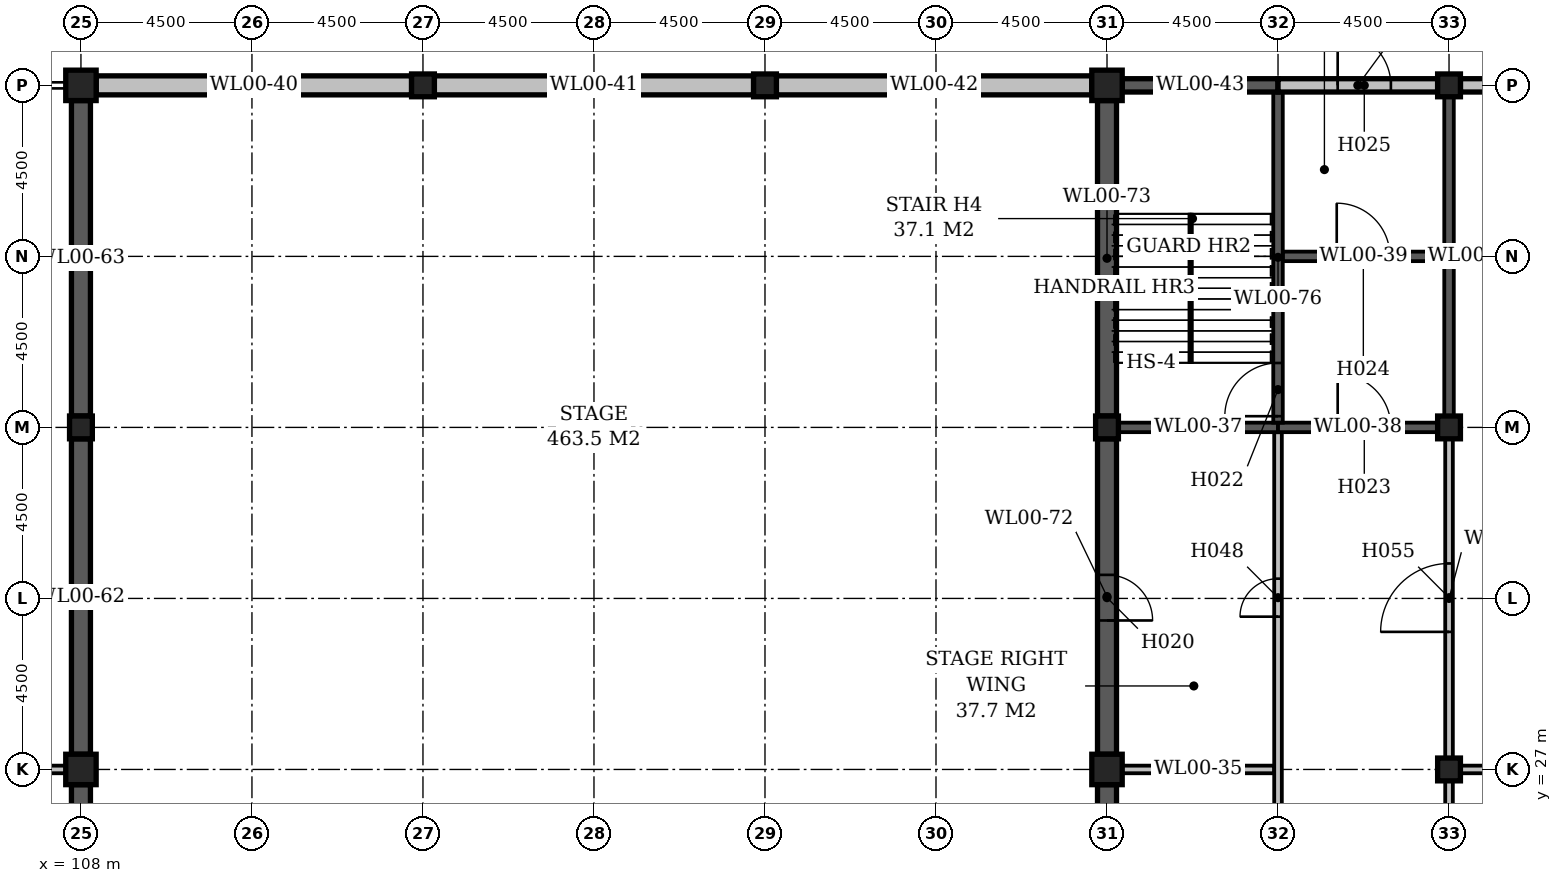
"""IFC4 building model, lengths in metres.
Left out: names, types, materials, properties, quantities, classifications, styles, units other than length and angle.
Written with IfcOpenShell. Run it as: python <this file> out.ifc"""

import sys

from ifc_helpers import new_model, si_unit, direction, frame, frame_2d, origin, origin_2d, place, context, subcontext, project, spatial, rectangle, extrude, element, fill, save


model = new_model("IFC4")
c1 = context("Model", 3, precision=1e-05, world=origin(), true_north=direction((0.0, 1.0)))
c2 = subcontext(c1, "Body", "Model", "MODEL_VIEW")
j1 = project(units=[si_unit("LENGTHUNIT", "METRE"), si_unit("PLANEANGLEUNIT", "RADIAN")], contexts=[c1])
p1 = place(None, origin())
s1 = spatial("IfcSite", under=j1, at=p1, CompositionType="ELEMENT")
p2 = place(p1, origin())
s2 = spatial("IfcBuilding", under=s1, at=p2, CompositionType="ELEMENT")
p3 = place(p2, origin())
s3 = spatial("IfcBuildingStorey", under=s2, at=p3, CompositionType="ELEMENT", Elevation=0.0)
p4 = place(p3, frame((108.0, 27.0, -0.3), z_axis=(0.0, 0.0, 1.0), x_axis=(1.0, 0.0, 0.0)))
e1 = element("IfcColumn", 1, at=p4, inside=s3, PredefinedType="COLUMN", context=c2, shape_type="SweptSolid", body=[
    extrude(rectangle(XDim=0.8, YDim=0.8, at=origin_2d()), origin(), (0.0, 0.0, 1.0), 9.0),
])
p5 = place(p3, frame((108.0, 36.0, -0.3), z_axis=(0.0, 0.0, 1.0), x_axis=(1.0, 0.0, 0.0)))
e2 = element("IfcColumn", 2, at=p5, inside=s3, PredefinedType="COLUMN", context=c2, shape_type="SweptSolid", body=[
    extrude(rectangle(XDim=0.6, YDim=0.6, at=origin_2d()), origin(), (0.0, 0.0, 1.0), 9.0),
])
p6 = place(p3, frame((108.0, 45.0, -0.3), z_axis=(0.0, 0.0, 1.0), x_axis=(1.0, 0.0, 0.0)))
e3 = element("IfcColumn", 3, at=p6, inside=s3, PredefinedType="COLUMN", context=c2, shape_type="SweptSolid", body=[
    extrude(rectangle(XDim=0.8, YDim=0.8, at=origin_2d()), origin(), (0.0, 0.0, 1.0), 9.0),
])
for number, where, z_axis, x_axis in (
    (4, (117.0, 45.0, -0.3), (0.0, 0.0, 1.0), (1.0, 0.0, 0.0)),
    (5, (126.0, 45.0, -0.3), (0.0, 0.0, 1.0), (1.0, 0.0, 0.0)),
):
    element("IfcColumn", number, at=place(p3, frame(where, z_axis=z_axis, x_axis=x_axis)), inside=s3, PredefinedType="COLUMN", context=c2, shape_type="SweptSolid", body=[
        extrude(rectangle(XDim=0.6, YDim=0.6, at=origin_2d()), origin(), (0.0, 0.0, 1.0), 9.0),
    ])
p7 = place(p3, frame((135.0, 27.0, -0.3), z_axis=(0.0, 0.0, 1.0), x_axis=(1.0, 0.0, 0.0)))
e6 = element("IfcColumn", 6, at=p7, inside=s3, PredefinedType="COLUMN", context=c2, shape_type="SweptSolid", body=[
    extrude(rectangle(XDim=0.8, YDim=0.8, at=origin_2d()), origin(), (0.0, 0.0, 1.0), 9.0),
])
p8 = place(p3, frame((135.0, 36.0, -0.3), z_axis=(0.0, 0.0, 1.0), x_axis=(1.0, 0.0, 0.0)))
e7 = element("IfcColumn", 7, at=p8, inside=s3, PredefinedType="COLUMN", context=c2, shape_type="SweptSolid", body=[
    extrude(rectangle(XDim=0.6, YDim=0.6, at=origin_2d()), origin(), (0.0, 0.0, 1.0), 9.0),
])
p9 = place(p3, frame((135.0, 45.0, -0.3), z_axis=(0.0, 0.0, 1.0), x_axis=(1.0, 0.0, 0.0)))
e8 = element("IfcColumn", 8, at=p9, inside=s3, PredefinedType="COLUMN", context=c2, shape_type="SweptSolid", body=[
    extrude(rectangle(XDim=0.8, YDim=0.8, at=origin_2d()), origin(), (0.0, 0.0, 1.0), 9.0),
])
for number, where, z_axis, x_axis in (
    (9, (144.0, 27.0, 0.0), (0.0, 0.0, 1.0), (1.0, 0.0, 0.0)),
    (10, (144.0, 36.0, 0.0), (0.0, 0.0, 1.0), (1.0, 0.0, 0.0)),
    (11, (144.0, 45.0, 0.0), (0.0, 0.0, 1.0), (1.0, 0.0, 0.0)),
):
    element("IfcColumn", number, at=place(p3, frame(where, z_axis=z_axis, x_axis=x_axis)), inside=s3, PredefinedType="COLUMN", context=c2, shape_type="SweptSolid", body=[
        extrude(rectangle(XDim=0.6, YDim=0.6, at=origin_2d()), origin(), (0.0, 0.0, 1.0), 8.7),
    ])
p10 = place(p3, frame((99.3, 27.0, 0.0), z_axis=(0.0, 0.0, 1.0), x_axis=(1.0, 0.0, 0.0)))
e12 = element("IfcWall", 12, at=p10, inside=s3, PredefinedType="STANDARD", context=c2, shape_type="SweptSolid", body=[
    extrude(rectangle(XDim=8.3, YDim=0.2, at=frame_2d((4.15, 0.0))), origin(), (0.0, 0.0, 1.0), 8.7),
])
p11 = place(p10, frame((0.12, 0.0, 0.0)))
e13 = element("IfcOpeningElement", 13, at=p11, cuts=e12, PredefinedType="OPENING", context=c2, shape_type="SweptSolid", body=[
    extrude(rectangle(XDim=1.8, YDim=2.4, at=frame_2d((0.9, 1.2))), frame((0.0, 0.112, 0.0), z_axis=(0.0, -1.0, 0.0), x_axis=(1.0, 0.0, 0.0)), (0.0, 0.0, 1.0), 0.224),
])
p12 = place(p10, frame((5.97, 0.0, 0.0)))
e14 = element("IfcOpeningElement", 14, at=p12, cuts=e12, PredefinedType="OPENING", context=c2, shape_type="SweptSolid", body=[
    extrude(rectangle(XDim=1.0, YDim=2.1, at=frame_2d((0.5, 1.05))), frame((0.0, 0.112, 0.0), z_axis=(0.0, -1.0, 0.0), x_axis=(1.0, 0.0, 0.0)), (0.0, 0.0, 1.0), 0.224),
])
p13 = place(p3, frame((135.4, 27.0, 0.0), z_axis=(0.0, 0.0, 1.0), x_axis=(1.0, 0.0, 0.0)))
e15 = element("IfcWall", 15, at=p13, inside=s3, PredefinedType="STANDARD", context=c2, shape_type="SweptSolid", body=[
    extrude(rectangle(XDim=4.0, YDim=0.2, at=frame_2d((2.0, 0.0))), origin(), (0.0, 0.0, 1.0), 8.7),
])
p14 = place(p3, frame((144.3, 27.0, 0.0), z_axis=(0.0, 0.0, 1.0), x_axis=(1.0, 0.0, 0.0)))
e16 = element("IfcWall", 16, at=p14, inside=s3, PredefinedType="STANDARD", context=c2, shape_type="SweptSolid", body=[
    extrude(rectangle(XDim=8.4, YDim=0.2, at=frame_2d((4.2, 0.0))), origin(), (0.0, 0.0, 1.0), 8.7),
])
p15 = place(p3, frame((135.3, 36.0, 0.0), z_axis=(0.0, 0.0, 1.0), x_axis=(1.0, 0.0, 0.0)))
e17 = element("IfcWall", 17, at=p15, inside=s3, PredefinedType="STANDARD", context=c2, shape_type="SweptSolid", body=[
    extrude(rectangle(XDim=4.2, YDim=0.25, at=frame_2d((2.1, 0.0))), origin(), (0.0, 0.0, 1.0), 9.0),
])
p16 = place(p3, frame((139.5, 36.0, 0.0), z_axis=(0.0, 0.0, 1.0), x_axis=(1.0, 0.0, 0.0)))
e18 = element("IfcWall", 18, at=p16, inside=s3, PredefinedType="STANDARD", context=c2, shape_type="SweptSolid", body=[
    extrude(rectangle(XDim=4.2, YDim=0.25, at=frame_2d((2.1, 0.0))), origin(), (0.0, 0.0, 1.0), 8.7),
])
p17 = place(p16, frame((1.57, 0.0, 0.0)))
e19 = element("IfcOpeningElement", 19, at=p17, cuts=e18, PredefinedType="OPENING", context=c2, shape_type="SweptSolid", body=[
    extrude(rectangle(XDim=1.4, YDim=2.1, at=frame_2d((0.7, 1.05))), frame((0.0, 0.137, 0.0), z_axis=(0.0, -1.0, 0.0), x_axis=(1.0, 0.0, 0.0)), (0.0, 0.0, 1.0), 0.274),
])
p18 = place(p3, frame((139.625, 40.5, 0.0), z_axis=(0.0, 0.0, 1.0), x_axis=(1.0, 0.0, 0.0)))
e20 = element("IfcWall", 20, at=p18, inside=s3, PredefinedType="STANDARD", context=c2, shape_type="SweptSolid", body=[
    extrude(rectangle(XDim=4.25, YDim=0.25, at=frame_2d((2.125, 0.0))), origin(), (0.0, 0.0, 1.0), 8.7),
])
p19 = place(p18, frame((1.42, 0.0, 0.0)))
e21 = element("IfcOpeningElement", 21, at=p19, cuts=e20, PredefinedType="OPENING", context=c2, shape_type="SweptSolid", body=[
    extrude(rectangle(XDim=1.4, YDim=2.1, at=frame_2d((0.7, 1.05))), frame((0.0, 0.137, 0.0), z_axis=(0.0, -1.0, 0.0), x_axis=(1.0, 0.0, 0.0)), (0.0, 0.0, 1.0), 0.274),
])
p20 = place(p3, frame((108.4, 45.0, 0.0), z_axis=(0.0, 0.0, 1.0), x_axis=(1.0, 0.0, 0.0)))
e22 = element("IfcWall", 22, at=p20, inside=s3, PredefinedType="STANDARD", context=c2, shape_type="SweptSolid", body=[
    extrude(rectangle(XDim=8.3, YDim=0.5, at=frame_2d((4.15, 0.0))), origin(), (0.0, 0.0, 1.0), 9.0),
])
p21 = place(p3, frame((117.3, 45.0, 0.0), z_axis=(0.0, 0.0, 1.0), x_axis=(1.0, 0.0, 0.0)))
e23 = element("IfcWall", 23, at=p21, inside=s3, PredefinedType="STANDARD", context=c2, shape_type="SweptSolid", body=[
    extrude(rectangle(XDim=8.4, YDim=0.5, at=frame_2d((4.2, 0.0))), origin(), (0.0, 0.0, 1.0), 9.0),
])
p22 = place(p3, frame((126.3, 45.0, 0.0), z_axis=(0.0, 0.0, 1.0), x_axis=(1.0, 0.0, 0.0)))
e24 = element("IfcWall", 24, at=p22, inside=s3, PredefinedType="STANDARD", context=c2, shape_type="SweptSolid", body=[
    extrude(rectangle(XDim=8.3, YDim=0.5, at=frame_2d((4.15, 0.0))), origin(), (0.0, 0.0, 1.0), 9.0),
])
p23 = place(p3, frame((135.4, 45.0, 0.0), z_axis=(0.0, 0.0, 1.0), x_axis=(1.0, 0.0, 0.0)))
e25 = element("IfcWall", 25, at=p23, inside=s3, PredefinedType="STANDARD", context=c2, shape_type="SweptSolid", body=[
    extrude(rectangle(XDim=4.1, YDim=0.35, at=frame_2d((2.05, 0.0))), origin(), (0.0, 0.0, 1.0), 9.0),
])
p24 = place(p3, frame((139.5, 45.0, 0.0), z_axis=(0.0, 0.0, 1.0), x_axis=(1.0, 0.0, 0.0)))
e26 = element("IfcWall", 26, at=p24, inside=s3, PredefinedType="STANDARD", context=c2, shape_type="SweptSolid", body=[
    extrude(rectangle(XDim=4.2, YDim=0.35, at=frame_2d((2.1, 0.0))), origin(), (0.0, 0.0, 1.0), 8.1),
])
p25 = place(p24, frame((1.57, 0.0, 0.0)))
e27 = element("IfcOpeningElement", 27, at=p25, cuts=e26, PredefinedType="OPENING", context=c2, shape_type="SweptSolid", body=[
    extrude(rectangle(XDim=1.4, YDim=2.1, at=frame_2d((0.7, 1.05))), frame((0.0, 0.187, 0.0), z_axis=(0.0, -1.0, 0.0), x_axis=(1.0, 0.0, 0.0)), (0.0, 0.0, 1.0), 0.374),
])
p26 = place(p3, frame((144.3, 45.0, 0.0), z_axis=(0.0, 0.0, 1.0), x_axis=(1.0, 0.0, 0.0)))
e28 = element("IfcWall", 28, at=p26, inside=s3, PredefinedType="STANDARD", context=c2, shape_type="SweptSolid", body=[
    extrude(rectangle(XDim=8.35, YDim=0.35, at=frame_2d((4.175, 0.0))), origin(), (0.0, 0.0, 1.0), 8.1),
])
p27 = place(p26, frame((1.038, 0.0, 1.2)))
e29 = element("IfcOpeningElement", 29, at=p27, cuts=e28, PredefinedType="OPENING", context=c2, shape_type="SweptSolid", body=[
    extrude(rectangle(XDim=2.1, YDim=2.4, at=frame_2d((1.05, 1.2))), frame((0.0, 0.187, 0.0), z_axis=(0.0, -1.0, 0.0), x_axis=(1.0, 0.0, 0.0)), (0.0, 0.0, 1.0), 0.374),
])
p28 = place(p26, frame((5.212, 0.0, 1.2)))
e30 = element("IfcOpeningElement", 30, at=p28, cuts=e28, PredefinedType="OPENING", context=c2, shape_type="SweptSolid", body=[
    extrude(rectangle(XDim=2.1, YDim=2.4, at=frame_2d((1.05, 1.2))), frame((0.0, 0.187, 0.0), z_axis=(0.0, -1.0, 0.0), x_axis=(1.0, 0.0, 0.0)), (0.0, 0.0, 1.0), 0.374),
])
p29 = place(p3, frame((108.0, 18.4, 0.0), z_axis=(0.0, 0.0, 1.0), x_axis=(0.0, 1.0, 0.0)))
e31 = element("IfcWall", 31, at=p29, inside=s3, PredefinedType="STANDARD", context=c2, shape_type="SweptSolid", body=[
    extrude(rectangle(XDim=8.2, YDim=0.5, at=frame_2d((4.1, 0.0))), origin(), (0.0, 0.0, 1.0), 9.0),
])
p30 = place(p29, frame((1.72, 0.0, 0.0)))
e32 = element("IfcOpeningElement", 32, at=p30, cuts=e31, PredefinedType="OPENING", context=c2, shape_type="SweptSolid", body=[
    extrude(rectangle(XDim=1.8, YDim=2.4, at=frame_2d((0.9, 1.2))), frame((0.0, 0.262, 0.0), z_axis=(0.0, -1.0, 0.0), x_axis=(1.0, 0.0, 0.0)), (0.0, 0.0, 1.0), 0.524),
])
for number, where, z_axis, x_axis in (
    (33, (108.0, 27.4, 0.0), (0.0, 0.0, 1.0), (0.0, 1.0, 0.0)),
    (34, (108.0, 36.3, 0.0), (0.0, 0.0, 1.0), (0.0, 1.0, 0.0)),
):
    element("IfcWall", number, at=place(p3, frame(where, z_axis=z_axis, x_axis=x_axis)), inside=s3, PredefinedType="STANDARD", context=c2, shape_type="SweptSolid", body=[
        extrude(rectangle(XDim=8.3, YDim=0.5, at=frame_2d((4.15, 0.0))), origin(), (0.0, 0.0, 1.0), 9.0),
    ])
p31 = place(p3, frame((135.0, 18.4, 0.0), z_axis=(0.0, 0.0, 1.0), x_axis=(0.0, 1.0, 0.0)))
e35 = element("IfcWall", 35, at=p31, inside=s3, PredefinedType="STANDARD", context=c2, shape_type="SweptSolid", body=[
    extrude(rectangle(XDim=8.2, YDim=0.5, at=frame_2d((4.1, 0.0))), origin(), (0.0, 0.0, 1.0), 9.0),
])
p32 = place(p3, frame((135.0, 27.4, 0.0), z_axis=(0.0, 0.0, 1.0), x_axis=(0.0, 1.0, 0.0)))
e36 = element("IfcWall", 36, at=p32, inside=s3, PredefinedType="STANDARD", context=c2, shape_type="SweptSolid", body=[
    extrude(rectangle(XDim=8.3, YDim=0.5, at=frame_2d((4.15, 0.0))), origin(), (0.0, 0.0, 1.0), 9.0),
])
p33 = place(p32, frame((3.52, 0.0, 0.0)))
e37 = element("IfcOpeningElement", 37, at=p33, cuts=e36, PredefinedType="OPENING", context=c2, shape_type="SweptSolid", body=[
    extrude(rectangle(XDim=1.2, YDim=2.4, at=frame_2d((0.6, 1.2))), frame((0.0, 0.262, 0.0), z_axis=(0.0, -1.0, 0.0), x_axis=(1.0, 0.0, 0.0)), (0.0, 0.0, 1.0), 0.524),
])
p34 = place(p3, frame((135.0, 36.3, 0.0), z_axis=(0.0, 0.0, 1.0), x_axis=(0.0, 1.0, 0.0)))
e38 = element("IfcWall", 38, at=p34, inside=s3, PredefinedType="STANDARD", context=c2, shape_type="SweptSolid", body=[
    extrude(rectangle(XDim=8.3, YDim=0.5, at=frame_2d((4.15, 0.0))), origin(), (0.0, 0.0, 1.0), 9.0),
])
p35 = place(p3, frame((139.5, 0.1, 0.0), z_axis=(0.0, 0.0, 1.0), x_axis=(0.0, 1.0, 0.0)))
e39 = element("IfcWall", 39, at=p35, inside=s3, PredefinedType="STANDARD", context=c2, shape_type="SweptSolid", body=[
    extrude(rectangle(XDim=35.775, YDim=0.2, at=frame_2d((17.887, 0.0))), origin(), (0.0, 0.0, 1.0), 8.7),
])
p36 = place(p35, frame((30.92, 0.0, 0.0)))
e40 = element("IfcOpeningElement", 40, at=p36, cuts=e39, PredefinedType="OPENING", context=c2, shape_type="SweptSolid", body=[
    extrude(rectangle(XDim=1.0, YDim=2.1, at=frame_2d((0.5, 1.05))), frame((0.0, 0.112, 0.0), z_axis=(0.0, -1.0, 0.0), x_axis=(1.0, 0.0, 0.0)), (0.0, 0.0, 1.0), 0.224),
])
p37 = place(p35, frame((3.92, 0.0, 0.0)))
e41 = element("IfcOpeningElement", 41, at=p37, cuts=e39, PredefinedType="OPENING", context=c2, shape_type="SweptSolid", body=[
    extrude(rectangle(XDim=1.0, YDim=2.1, at=frame_2d((0.5, 1.05))), frame((0.0, 0.112, 0.0), z_axis=(0.0, -1.0, 0.0), x_axis=(1.0, 0.0, 0.0)), (0.0, 0.0, 1.0), 0.224),
])
p38 = place(p35, frame((12.92, 0.0, 0.0)))
e42 = element("IfcOpeningElement", 42, at=p38, cuts=e39, PredefinedType="OPENING", context=c2, shape_type="SweptSolid", body=[
    extrude(rectangle(XDim=1.0, YDim=2.1, at=frame_2d((0.5, 1.05))), frame((0.0, 0.112, 0.0), z_axis=(0.0, -1.0, 0.0), x_axis=(1.0, 0.0, 0.0)), (0.0, 0.0, 1.0), 0.224),
])
p39 = place(p35, frame((21.92, 0.0, 0.0)))
e43 = element("IfcOpeningElement", 43, at=p39, cuts=e39, PredefinedType="OPENING", context=c2, shape_type="SweptSolid", body=[
    extrude(rectangle(XDim=1.0, YDim=2.1, at=frame_2d((0.5, 1.05))), frame((0.0, 0.112, 0.0), z_axis=(0.0, -1.0, 0.0), x_axis=(1.0, 0.0, 0.0)), (0.0, 0.0, 1.0), 0.224),
])
p40 = place(p3, frame((139.5, 36.125, 0.0), z_axis=(0.0, 0.0, 1.0), x_axis=(0.0, 1.0, 0.0)))
e44 = element("IfcWall", 44, at=p40, inside=s3, PredefinedType="STANDARD", context=c2, shape_type="SweptSolid", body=[
    extrude(rectangle(XDim=8.7, YDim=0.25, at=frame_2d((4.35, 0.0))), origin(), (0.0, 0.0, 1.0), 9.0),
])
p41 = place(p40, frame((0.17, 0.0, 0.0)))
e45 = element("IfcOpeningElement", 45, at=p41, cuts=e44, PredefinedType="OPENING", context=c2, shape_type="SweptSolid", body=[
    extrude(rectangle(XDim=1.4, YDim=2.1, at=frame_2d((0.7, 1.05))), frame((0.0, 0.137, 0.0), z_axis=(0.0, -1.0, 0.0), x_axis=(1.0, 0.0, 0.0)), (0.0, 0.0, 1.0), 0.274),
])
p42 = place(p3, frame((144.0, 18.3, 0.0), z_axis=(0.0, 0.0, 1.0), x_axis=(0.0, 1.0, 0.0)))
e46 = element("IfcWall", 46, at=p42, inside=s3, PredefinedType="STANDARD", context=c2, shape_type="SweptSolid", body=[
    extrude(rectangle(XDim=8.4, YDim=0.2, at=frame_2d((4.2, 0.0))), origin(), (0.0, 0.0, 1.0), 8.7),
])
p43 = place(p42, frame((2.97, 0.0, 0.0)))
e47 = element("IfcOpeningElement", 47, at=p43, cuts=e46, PredefinedType="OPENING", context=c2, shape_type="SweptSolid", body=[
    extrude(rectangle(XDim=1.0, YDim=2.1, at=frame_2d((0.5, 1.05))), frame((0.0, 0.112, 0.0), z_axis=(0.0, -1.0, 0.0), x_axis=(1.0, 0.0, 0.0)), (0.0, 0.0, 1.0), 0.224),
])
p44 = place(p3, frame((144.0, 27.3, 0.0), z_axis=(0.0, 0.0, 1.0), x_axis=(0.0, 1.0, 0.0)))
e48 = element("IfcWall", 48, at=p44, inside=s3, PredefinedType="STANDARD", context=c2, shape_type="SweptSolid", body=[
    extrude(rectangle(XDim=8.4, YDim=0.2, at=frame_2d((4.2, 0.0))), origin(), (0.0, 0.0, 1.0), 8.7),
])
p45 = place(p44, frame((3.32, 0.0, 0.0)))
e49 = element("IfcOpeningElement", 49, at=p45, cuts=e48, PredefinedType="OPENING", context=c2, shape_type="SweptSolid", body=[
    extrude(rectangle(XDim=1.8, YDim=2.4, at=frame_2d((0.9, 1.2))), frame((0.0, 0.112, 0.0), z_axis=(0.0, -1.0, 0.0), x_axis=(1.0, 0.0, 0.0)), (0.0, 0.0, 1.0), 0.224),
])
p46 = place(p3, frame((144.0, 36.3, 0.0), z_axis=(0.0, 0.0, 1.0), x_axis=(0.0, 1.0, 0.0)))
e50 = element("IfcWall", 50, at=p46, inside=s3, PredefinedType="STANDARD", context=c2, shape_type="SweptSolid", body=[
    extrude(rectangle(XDim=8.4, YDim=0.25, at=frame_2d((4.2, 0.0))), origin(), (0.0, 0.0, 1.0), 8.7),
])
p47 = place(p33, frame((1.2, 0.0, 0.0), z_axis=(0.0, 0.0, 1.0), x_axis=(-1.0, 0.0, 0.0)))
e51 = element("IfcDoor", 51, at=p47, inside=s3, OperationType="SINGLE_SWING_RIGHT", PredefinedType="DOOR", context=c2, shape_type="SweptSolid", body=[
    extrude(rectangle(XDim=1.2, YDim=2.4, at=frame_2d((0.6, 1.2))), frame((0.0, 0.025, 0.0), z_axis=(0.0, -1.0, 0.0), x_axis=(1.0, 0.0, 0.0)), (0.0, 0.0, 1.0), 0.05),
])
fill(e37, e51)
p48 = place(p41, origin())
e52 = element("IfcDoor", 52, at=p48, inside=s3, OperationType="DOUBLE_DOOR_SINGLE_SWING", PredefinedType="DOOR", context=c2, shape_type="SweptSolid", body=[
    extrude(rectangle(XDim=1.4, YDim=2.1, at=frame_2d((0.7, 1.05))), frame((0.0, 0.025, 0.0), z_axis=(0.0, -1.0, 0.0), x_axis=(1.0, 0.0, 0.0)), (0.0, 0.0, 1.0), 0.05),
])
fill(e45, e52)
p49 = place(p17, origin())
e53 = element("IfcDoor", 53, at=p49, inside=s3, OperationType="DOUBLE_DOOR_SINGLE_SWING", PredefinedType="DOOR", context=c2, shape_type="SweptSolid", body=[
    extrude(rectangle(XDim=1.4, YDim=2.1, at=frame_2d((0.7, 1.05))), frame((0.0, 0.025, 0.0), z_axis=(0.0, -1.0, 0.0), x_axis=(1.0, 0.0, 0.0)), (0.0, 0.0, 1.0), 0.05),
])
fill(e19, e53)
p50 = place(p19, origin())
e54 = element("IfcDoor", 54, at=p50, inside=s3, OperationType="DOUBLE_DOOR_SINGLE_SWING", PredefinedType="DOOR", context=c2, shape_type="SweptSolid", body=[
    extrude(rectangle(XDim=1.4, YDim=2.1, at=frame_2d((0.7, 1.05))), frame((0.0, 0.025, 0.0), z_axis=(0.0, -1.0, 0.0), x_axis=(1.0, 0.0, 0.0)), (0.0, 0.0, 1.0), 0.05),
])
fill(e21, e54)
p51 = place(p25, origin())
e55 = element("IfcDoor", 55, at=p51, inside=s3, OperationType="DOUBLE_DOOR_SINGLE_SWING", PredefinedType="DOOR", context=c2, shape_type="SweptSolid", body=[
    extrude(rectangle(XDim=1.4, YDim=2.1, at=frame_2d((0.7, 1.05))), frame((0.0, 0.025, 0.0), z_axis=(0.0, -1.0, 0.0), x_axis=(1.0, 0.0, 0.0)), (0.0, 0.0, 1.0), 0.05),
])
fill(e27, e55)
p52 = place(p36, origin())
e56 = element("IfcDoor", 56, at=p52, inside=s3, OperationType="SINGLE_SWING_LEFT", PredefinedType="DOOR", context=c2, shape_type="SweptSolid", body=[
    extrude(rectangle(XDim=1.0, YDim=2.1, at=frame_2d((0.5, 1.05))), frame((0.0, 0.025, 0.0), z_axis=(0.0, -1.0, 0.0), x_axis=(1.0, 0.0, 0.0)), (0.0, 0.0, 1.0), 0.05),
])
fill(e40, e56)
p53 = place(p45, origin())
e57 = element("IfcDoor", 57, at=p53, inside=s3, OperationType="DOUBLE_DOOR_SINGLE_SWING", PredefinedType="DOOR", context=c2, shape_type="SweptSolid", body=[
    extrude(rectangle(XDim=1.8, YDim=2.4, at=frame_2d((0.9, 1.2))), frame((0.0, 0.025, 0.0), z_axis=(0.0, -1.0, 0.0), x_axis=(1.0, 0.0, 0.0)), (0.0, 0.0, 1.0), 0.05),
])
fill(e49, e57)
save(model, sys.argv[1])
